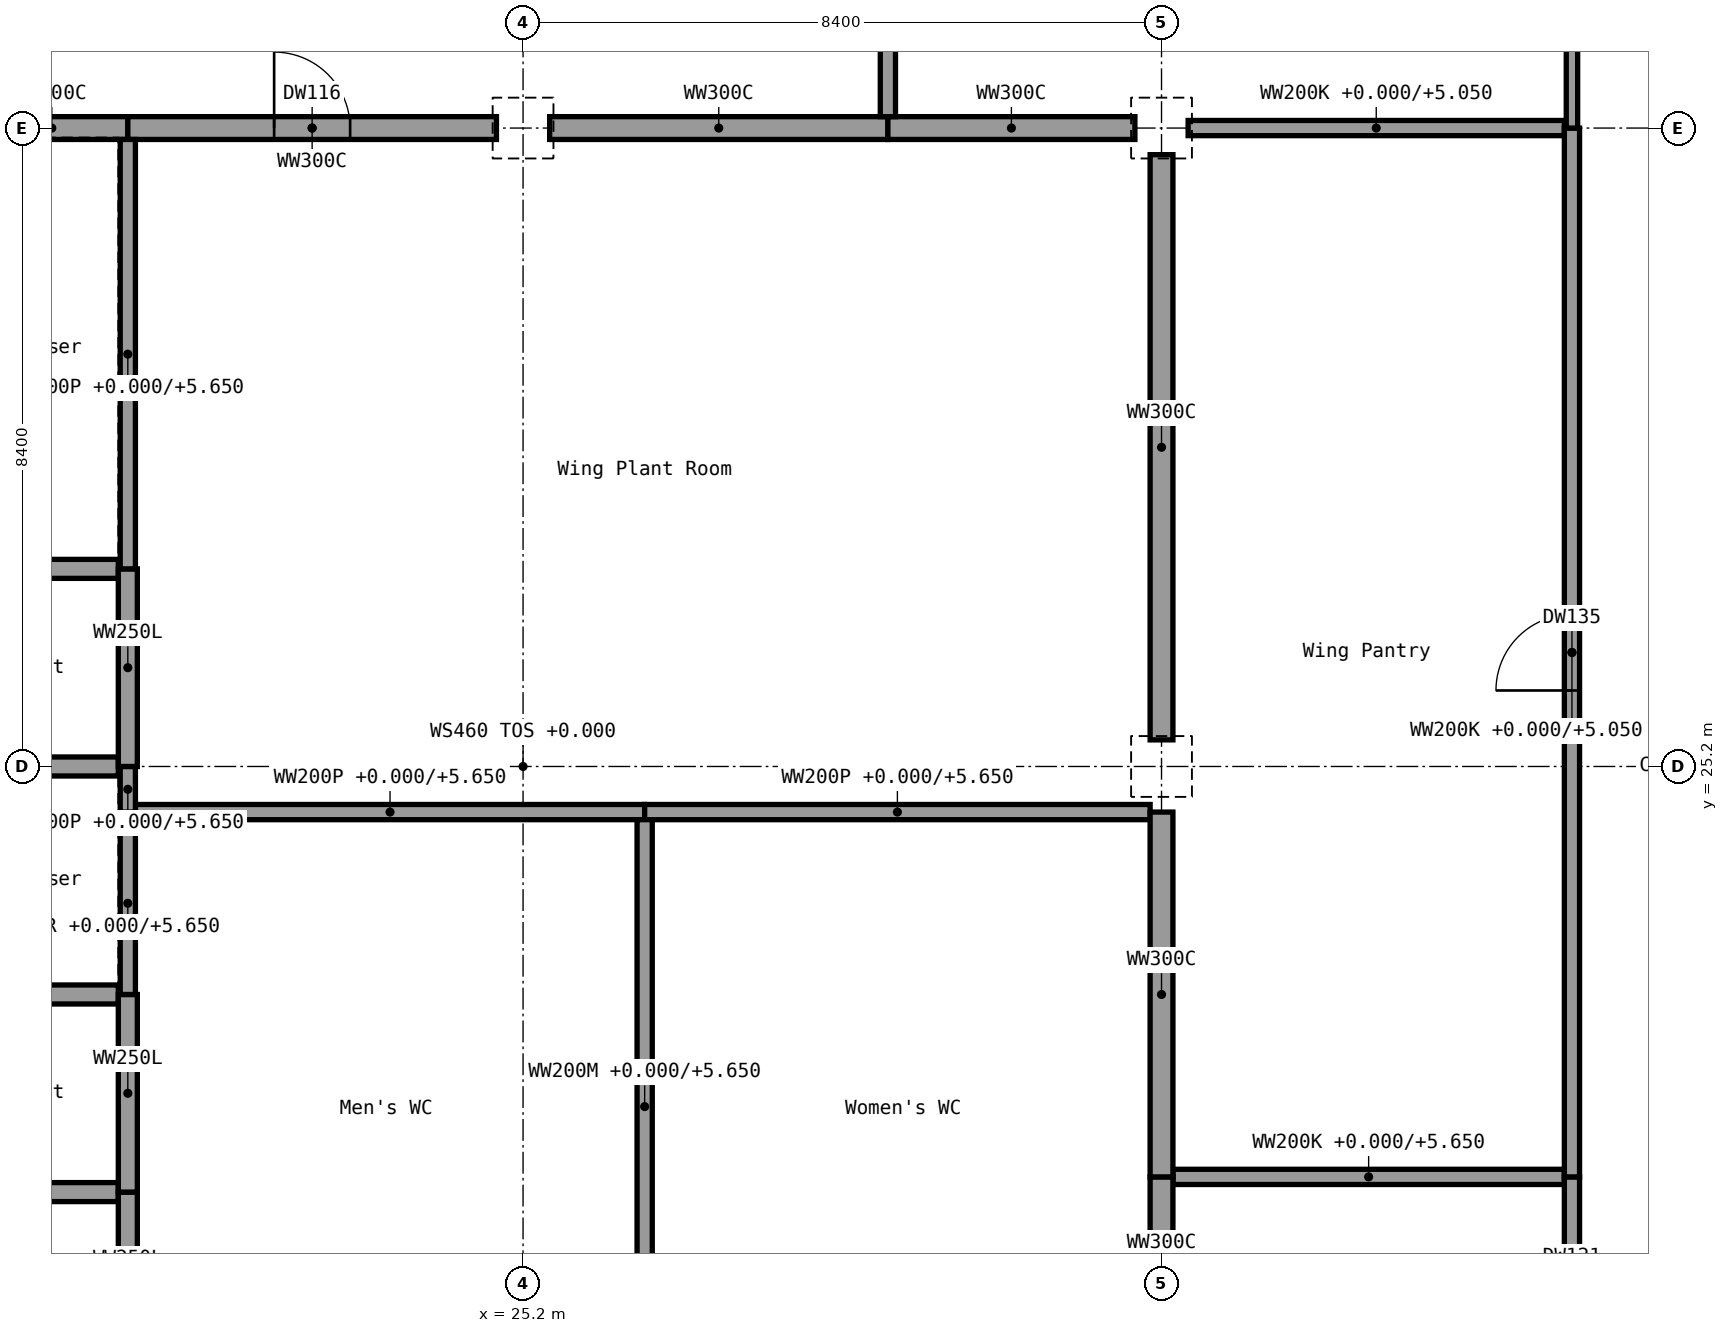
"""IFC4 building model, lengths in metres.
Left out: names, types, materials, properties, quantities, classifications, styles, units other than length and angle.
Written with IfcOpenShell. Run it as: python <this file> out.ifc"""

import sys

from ifc_helpers import new_model, si_unit, direction, frame, frame_2d, origin, origin_2d, place, context, subcontext, project, spatial, rectangle, extrude, element, fill, save


model = new_model("IFC4")
c1 = context("Model", 3, precision=1e-05, world=origin(), true_north=direction((0.0, 1.0)))
c2 = subcontext(c1, "Body", "Model", "MODEL_VIEW")
j1 = project(units=[si_unit("LENGTHUNIT", "METRE"), si_unit("PLANEANGLEUNIT", "RADIAN")], contexts=[c1])
p1 = place(None, origin())
s1 = spatial("IfcSite", under=j1, at=p1, CompositionType="ELEMENT")
p2 = place(p1, origin())
s2 = spatial("IfcBuilding", under=s1, at=p2, CompositionType="ELEMENT")
p3 = place(p2, origin())
s3 = spatial("IfcBuildingStorey", under=s2, at=p3, CompositionType="ELEMENT", Elevation=0.0)
for number, where, z_axis, x_axis in (
    (1, (25.2, 33.6, 0.0), (0.0, 0.0, 1.0), (1.0, 0.0, 0.0)),
    (2, (33.6, 25.2, 0.0), (0.0, 0.0, 1.0), (1.0, 0.0, 0.0)),
    (3, (33.6, 33.6, 0.0), (0.0, 0.0, 1.0), (1.0, 0.0, 0.0)),
):
    element("IfcColumn", number, at=place(p3, frame(where, z_axis=z_axis, x_axis=x_axis)), inside=s3, PredefinedType="COLUMN", context=c2, shape_type="SweptSolid", body=[
        extrude(rectangle(XDim=0.7, YDim=0.7, at=origin_2d()), origin(), (0.0, 0.0, 1.0), 6.0),
    ])
p4 = place(p3, frame((16.925, 19.6, 0.0), z_axis=(0.0, 0.0, 1.0), x_axis=(1.0, 0.0, 0.0)))
e4 = element("IfcWall", 4, at=p4, inside=s3, PredefinedType="SHEAR", context=c2, shape_type="SweptSolid", body=[
    extrude(rectangle(XDim=2.95, YDim=0.25, at=frame_2d((1.475, 0.0))), origin(), (0.0, 0.0, 1.0), 5.65),
])
p5 = place(p3, frame((33.75, 19.8, 0.0), z_axis=(0.0, 0.0, 1.0), x_axis=(1.0, 0.0, 0.0)))
e5 = element("IfcWall", 5, at=p5, inside=s3, PredefinedType="SOLIDWALL", context=c2, shape_type="SweptSolid", body=[
    extrude(rectangle(XDim=5.15, YDim=0.2, at=frame_2d((2.575, 0.0))), origin(), (0.0, 0.0, 1.0), 5.65),
])
p6 = place(p3, frame((16.95, 22.2, 0.0), z_axis=(0.0, 0.0, 1.0), x_axis=(1.0, 0.0, 0.0)))
e6 = element("IfcWall", 6, at=p6, inside=s3, PredefinedType="SHEAR", context=c2, shape_type="SweptSolid", body=[
    extrude(rectangle(XDim=2.925, YDim=0.25, at=frame_2d((1.462, 0.0))), origin(), (0.0, 0.0, 1.0), 5.65),
])
p7 = place(p3, frame((20.1, 24.6, 0.0), z_axis=(0.0, 0.0, 1.0), x_axis=(1.0, 0.0, 0.0)))
e7 = element("IfcWall", 7, at=p7, inside=s3, PredefinedType="SOLIDWALL", context=c2, shape_type="SweptSolid", body=[
    extrude(rectangle(XDim=6.7, YDim=0.2, at=frame_2d((3.35, 0.0))), origin(), (0.0, 0.0, 1.0), 5.65),
])
p8 = place(p3, frame((26.8, 24.6, 0.0), z_axis=(0.0, 0.0, 1.0), x_axis=(1.0, 0.0, 0.0)))
e8 = element("IfcWall", 8, at=p8, inside=s3, PredefinedType="SOLIDWALL", context=c2, shape_type="SweptSolid", body=[
    extrude(rectangle(XDim=6.65, YDim=0.2, at=frame_2d((3.325, 0.0))), origin(), (0.0, 0.0, 1.0), 5.65),
])
p9 = place(p3, frame((17.15, 25.2, 0.0), z_axis=(0.0, 0.0, 1.0), x_axis=(1.0, 0.0, 0.0)))
e9 = element("IfcWall", 9, at=p9, inside=s3, PredefinedType="SHEAR", context=c2, shape_type="SweptSolid", body=[
    extrude(rectangle(XDim=2.725, YDim=0.25, at=frame_2d((1.363, 0.0))), origin(), (0.0, 0.0, 1.0), 5.65),
])
p10 = place(p3, frame((16.95, 27.8, 0.0), z_axis=(0.0, 0.0, 1.0), x_axis=(1.0, 0.0, 0.0)))
e10 = element("IfcWall", 10, at=p10, inside=s3, PredefinedType="SHEAR", context=c2, shape_type="SweptSolid", body=[
    extrude(rectangle(XDim=2.925, YDim=0.25, at=frame_2d((1.462, 0.0))), origin(), (0.0, 0.0, 1.0), 5.65),
])
p11 = place(p3, frame((18.0, 33.6, 0.0), z_axis=(0.0, 0.0, 1.0), x_axis=(1.0, 0.0, 0.0)))
e11 = element("IfcWall", 11, at=p11, inside=s3, PredefinedType="SHEAR", context=c2, shape_type="SweptSolid", body=[
    extrude(rectangle(XDim=2.0, YDim=0.3, at=frame_2d((1.0, 0.0))), origin(), (0.0, 0.0, 1.0), 5.65),
])
p12 = place(p3, frame((20.0, 33.6, 0.0), z_axis=(0.0, 0.0, 1.0), x_axis=(1.0, 0.0, 0.0)))
e12 = element("IfcWall", 12, at=p12, inside=s3, PredefinedType="SHEAR", context=c2, shape_type="SweptSolid", body=[
    extrude(rectangle(XDim=4.85, YDim=0.3, at=frame_2d((2.425, 0.0))), origin(), (0.0, 0.0, 1.0), 5.65),
])
p13 = place(p12, frame((1.925, 0.0, 0.0)))
e13 = element("IfcOpeningElement", 13, at=p13, cuts=e12, PredefinedType="OPENING", context=c2, shape_type="SweptSolid", body=[
    extrude(rectangle(XDim=1.0, YDim=2.1, at=frame_2d((0.5, 1.05))), frame((0.0, 0.15, 0.0), z_axis=(0.0, -1.0, 0.0), x_axis=(1.0, 0.0, 0.0)), (0.0, 0.0, 1.0), 0.3),
])
p14 = place(p3, frame((25.55, 33.6, 0.0), z_axis=(0.0, 0.0, 1.0), x_axis=(1.0, 0.0, 0.0)))
e14 = element("IfcWall", 14, at=p14, inside=s3, PredefinedType="SHEAR", context=c2, shape_type="SweptSolid", body=[
    extrude(rectangle(XDim=4.45, YDim=0.3, at=frame_2d((2.225, 0.0))), origin(), (0.0, 0.0, 1.0), 5.65),
])
p15 = place(p3, frame((30.0, 33.6, 0.0), z_axis=(0.0, 0.0, 1.0), x_axis=(1.0, 0.0, 0.0)))
e15 = element("IfcWall", 15, at=p15, inside=s3, PredefinedType="SHEAR", context=c2, shape_type="SweptSolid", body=[
    extrude(rectangle(XDim=3.25, YDim=0.3, at=frame_2d((1.625, 0.0))), origin(), (0.0, 0.0, 1.0), 5.65),
])
p16 = place(p3, frame((33.95, 33.6, 0.0), z_axis=(0.0, 0.0, 1.0), x_axis=(1.0, 0.0, 0.0)))
e16 = element("IfcWall", 16, at=p16, inside=s3, PredefinedType="SOLIDWALL", context=c2, shape_type="SweptSolid", body=[
    extrude(rectangle(XDim=4.95, YDim=0.2, at=frame_2d((2.475, 0.0))), origin(), (0.0, 0.0, 1.0), 5.05),
])
p17 = place(p3, frame((20.0, 16.95, 0.0), z_axis=(0.0, 0.0, 1.0), x_axis=(0.0, 1.0, 0.0)))
e17 = element("IfcWall", 17, at=p17, inside=s3, PredefinedType="SHEAR", context=c2, shape_type="SweptSolid", body=[
    extrude(rectangle(XDim=2.65, YDim=0.25, at=frame_2d((1.325, 0.0))), origin(), (0.0, 0.0, 1.0), 5.65),
])
p18 = place(p3, frame((20.0, 19.6, 0.0), z_axis=(0.0, 0.0, 1.0), x_axis=(0.0, 1.0, 0.0)))
e18 = element("IfcWall", 18, at=p18, inside=s3, PredefinedType="SHEAR", context=c2, shape_type="SweptSolid", body=[
    extrude(rectangle(XDim=2.6, YDim=0.25, at=frame_2d((1.3, 0.0))), origin(), (0.0, 0.0, 1.0), 5.65),
])
p19 = place(p3, frame((20.0, 22.2, 0.0), z_axis=(0.0, 0.0, 1.0), x_axis=(0.0, 1.0, 0.0)))
e19 = element("IfcWall", 19, at=p19, inside=s3, PredefinedType="SOLIDWALL", context=c2, shape_type="SweptSolid", body=[
    extrude(rectangle(XDim=2.4, YDim=0.2, at=frame_2d((1.2, 0.0))), origin(), (0.0, 0.0, 1.0), 5.65),
])
p20 = place(p3, frame((20.0, 24.6, 0.0), z_axis=(0.0, 0.0, 1.0), x_axis=(0.0, 1.0, 0.0)))
e20 = element("IfcWall", 20, at=p20, inside=s3, PredefinedType="SOLIDWALL", context=c2, shape_type="SweptSolid", body=[
    extrude(rectangle(XDim=0.6, YDim=0.2, at=frame_2d((0.3, 0.0))), origin(), (0.0, 0.0, 1.0), 5.65),
])
p21 = place(p3, frame((20.0, 25.2, 0.0), z_axis=(0.0, 0.0, 1.0), x_axis=(0.0, 1.0, 0.0)))
e21 = element("IfcWall", 21, at=p21, inside=s3, PredefinedType="SHEAR", context=c2, shape_type="SweptSolid", body=[
    extrude(rectangle(XDim=2.6, YDim=0.25, at=frame_2d((1.3, 0.0))), origin(), (0.0, 0.0, 1.0), 5.65),
])
p22 = place(p3, frame((20.0, 27.8, 0.0), z_axis=(0.0, 0.0, 1.0), x_axis=(0.0, 1.0, 0.0)))
e22 = element("IfcWall", 22, at=p22, inside=s3, PredefinedType="SOLIDWALL", context=c2, shape_type="SweptSolid", body=[
    extrude(rectangle(XDim=5.65, YDim=0.2, at=frame_2d((2.825, 0.0))), origin(), (0.0, 0.0, 1.0), 5.65),
])
p23 = place(p3, frame((26.8, 16.95, 0.0), z_axis=(0.0, 0.0, 1.0), x_axis=(0.0, 1.0, 0.0)))
e23 = element("IfcWall", 23, at=p23, inside=s3, PredefinedType="PARTITIONING", context=c2, shape_type="SweptSolid", body=[
    extrude(rectangle(XDim=7.55, YDim=0.2, at=frame_2d((3.775, 0.0))), origin(), (0.0, 0.0, 1.0), 5.65),
])
p24 = place(p3, frame((30.0, 33.75, 0.0), z_axis=(0.0, 0.0, 1.0), x_axis=(0.0, 1.0, 0.0)))
e24 = element("IfcWall", 24, at=p24, inside=s3, PredefinedType="SOLIDWALL", context=c2, shape_type="SweptSolid", body=[
    extrude(rectangle(XDim=5.15, YDim=0.2, at=frame_2d((2.575, 0.0))), origin(), (0.0, 0.0, 1.0), 5.65),
])
p25 = place(p3, frame((33.6, 17.15, 0.0), z_axis=(0.0, 0.0, 1.0), x_axis=(0.0, 1.0, 0.0)))
e25 = element("IfcWall", 25, at=p25, inside=s3, PredefinedType="SHEAR", context=c2, shape_type="SweptSolid", body=[
    extrude(rectangle(XDim=2.65, YDim=0.3, at=frame_2d((1.325, 0.0))), origin(), (0.0, 0.0, 1.0), 5.65),
])
p26 = place(p3, frame((33.6, 19.8, 0.0), z_axis=(0.0, 0.0, 1.0), x_axis=(0.0, 1.0, 0.0)))
e26 = element("IfcWall", 26, at=p26, inside=s3, PredefinedType="SHEAR", context=c2, shape_type="SweptSolid", body=[
    extrude(rectangle(XDim=4.8, YDim=0.3, at=frame_2d((2.4, 0.0))), origin(), (0.0, 0.0, 1.0), 5.65),
])
p27 = place(p3, frame((33.6, 25.55, 0.0), z_axis=(0.0, 0.0, 1.0), x_axis=(0.0, 1.0, 0.0)))
e27 = element("IfcWall", 27, at=p27, inside=s3, PredefinedType="SHEAR", context=c2, shape_type="SweptSolid", body=[
    extrude(rectangle(XDim=7.7, YDim=0.3, at=frame_2d((3.85, 0.0))), origin(), (0.0, 0.0, 1.0), 5.65),
])
p28 = place(p3, frame((39.0, 16.8, 0.0), z_axis=(0.0, 0.0, 1.0), x_axis=(0.0, 1.0, 0.0)))
e28 = element("IfcWall", 28, at=p28, inside=s3, PredefinedType="PARTITIONING", context=c2, shape_type="SweptSolid", body=[
    extrude(rectangle(XDim=3.0, YDim=0.2, at=frame_2d((1.5, 0.0))), origin(), (0.0, 0.0, 1.0), 5.05),
])
p29 = place(p28, frame((1.0, 0.0, 0.0)))
e29 = element("IfcOpeningElement", 29, at=p29, cuts=e28, PredefinedType="OPENING", context=c2, shape_type="SweptSolid", body=[
    extrude(rectangle(XDim=1.0, YDim=2.1, at=frame_2d((0.5, 1.05))), frame((0.0, 0.1, 0.0), z_axis=(0.0, -1.0, 0.0), x_axis=(1.0, 0.0, 0.0)), (0.0, 0.0, 1.0), 0.2),
])
p30 = place(p3, frame((39.0, 19.8, 0.0), z_axis=(0.0, 0.0, 1.0), x_axis=(0.0, 1.0, 0.0)))
e30 = element("IfcWall", 30, at=p30, inside=s3, PredefinedType="SOLIDWALL", context=c2, shape_type="SweptSolid", body=[
    extrude(rectangle(XDim=13.8, YDim=0.2, at=frame_2d((6.9, 0.0))), origin(), (0.0, 0.0, 1.0), 5.05),
])
p31 = place(p30, frame((6.4, 0.0, 0.0)))
e31 = element("IfcOpeningElement", 31, at=p31, cuts=e30, PredefinedType="OPENING", context=c2, shape_type="SweptSolid", body=[
    extrude(rectangle(XDim=1.0, YDim=2.1, at=frame_2d((0.5, 1.05))), frame((0.0, 0.1, 0.0), z_axis=(0.0, -1.0, 0.0), x_axis=(1.0, 0.0, 0.0)), (0.0, 0.0, 1.0), 0.2),
])
p32 = place(p3, frame((39.0, 33.6, 0.0), z_axis=(0.0, 0.0, 1.0), x_axis=(0.0, 1.0, 0.0)))
e32 = element("IfcWall", 32, at=p32, inside=s3, PredefinedType="PARTITIONING", context=c2, shape_type="SweptSolid", body=[
    extrude(rectangle(XDim=5.4, YDim=0.15, at=frame_2d((2.7, 0.0))), origin(), (0.0, 0.0, 1.0), 5.05),
])
p33 = place(p13, origin())
e33 = element("IfcDoor", 33, at=p33, inside=s3, OperationType="SINGLE_SWING_LEFT", PredefinedType="DOOR", context=c2, shape_type="SweptSolid", body=[
    extrude(rectangle(XDim=1.0, YDim=2.1, at=frame_2d((0.5, 1.05))), frame((0.0, 0.025, 0.0), z_axis=(0.0, -1.0, 0.0), x_axis=(1.0, 0.0, 0.0)), (0.0, 0.0, 1.0), 0.05),
])
fill(e13, e33)
p34 = place(p31, origin())
e34 = element("IfcDoor", 34, at=p34, inside=s3, OperationType="SINGLE_SWING_RIGHT", PredefinedType="DOOR", context=c2, shape_type="SweptSolid", body=[
    extrude(rectangle(XDim=1.0, YDim=2.1, at=frame_2d((0.5, 1.05))), frame((0.0, 0.025, 0.0), z_axis=(0.0, -1.0, 0.0), x_axis=(1.0, 0.0, 0.0)), (0.0, 0.0, 1.0), 0.05),
])
fill(e31, e34)
save(model, sys.argv[1])
